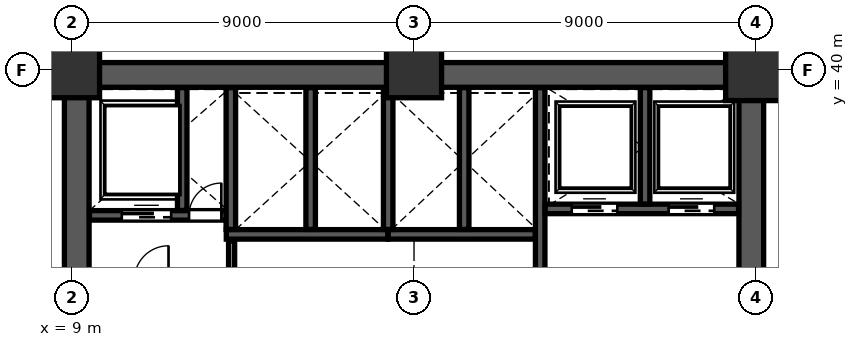
"""IFC4 building model, lengths in metres.
Left out: names, types, materials, properties, quantities, classifications, styles, units other than length and angle.
Written with IfcOpenShell. Run it as: python <this file> out.ifc"""

import sys

from ifc_helpers import new_model, si_unit, direction, frame, frame_2d, origin, origin_2d, place, context, subcontext, project, spatial, rectangle, extrude, source, transform, mapped, element, fill, save


model = new_model("IFC4")
c1 = context("Model", 3, precision=1e-05, world=origin(), true_north=direction((0.0, 1.0)))
c2 = subcontext(c1, "Body", "Model", "MODEL_VIEW")
j1 = project(units=[si_unit("LENGTHUNIT", "METRE"), si_unit("PLANEANGLEUNIT", "RADIAN")], contexts=[c1])
p1 = place(None, origin())
s1 = spatial("IfcSite", under=j1, at=p1, CompositionType="ELEMENT")
p2 = place(p1, origin())
s2 = spatial("IfcBuilding", under=s1, at=p2, CompositionType="ELEMENT")
p3 = place(p2, frame((0.0, 0.0, 22.2)))
s3 = spatial("IfcBuildingStorey", under=s2, at=p3, CompositionType="ELEMENT", Elevation=22.2)
m1 = source(origin(), c2, "Body", "SweptSolid", [
    extrude(rectangle(XDim=1.45, YDim=1.45, at=origin_2d()), origin(), (0.0, 0.0, 1.0), 5.799),
])
for number, where, z_axis, x_axis in (
    (1, (9.0, 40.0, 0.001), (0.0, 0.0, 1.0), (1.0, 0.0, 0.0)),
    (2, (18.0, 40.0, 0.001), (0.0, 0.0, 1.0), (1.0, 0.0, 0.0)),
):
    element("IfcColumn", number, at=place(p3, frame(where, z_axis=z_axis, x_axis=x_axis)), inside=s3, PredefinedType="COLUMN", context=c2, shape_type="MappedRepresentation", body=[
        mapped(m1, transform((0.0, 0.0, 0.0), scale=1.0)),
    ])
m2 = source(origin(), c2, "Body", "SweptSolid", [
    extrude(rectangle(XDim=1.6, YDim=1.6, at=origin_2d()), origin(), (0.0, 0.0, 1.0), 5.799),
])
p4 = place(p3, frame((27.0, 40.0, 0.001), z_axis=(0.0, 0.0, 1.0), x_axis=(1.0, 0.0, 0.0)))
e3 = element("IfcColumn", 3, at=p4, inside=s3, PredefinedType="COLUMN", context=c2, shape_type="MappedRepresentation", body=[
    mapped(m2, transform((0.0, 0.0, 0.0), scale=1.0)),
])
p5 = place(p3, frame((9.125, 24.45, 0.0), z_axis=(0.0, 0.0, 1.0), x_axis=(0.0, 1.0, 0.0)))
e4 = element("IfcWall", 4, at=p5, inside=s3, PredefinedType="SHEAR", context=c2, shape_type="SweptSolid", body=[
    extrude(rectangle(XDim=15.1, YDim=0.65, at=frame_2d((7.55, 0.0))), origin(), (0.0, 0.0, 1.0), 5.52),
])
p6 = place(p3, frame((26.875, 24.45, 0.0), z_axis=(0.0, 0.0, 1.0), x_axis=(0.0, 1.0, 0.0)))
e5 = element("IfcWall", 5, at=p6, inside=s3, PredefinedType="SHEAR", context=c2, shape_type="SweptSolid", body=[
    extrude(rectangle(XDim=15.1, YDim=0.65, at=frame_2d((7.55, 0.0))), origin(), (0.0, 0.0, 1.0), 5.52),
])
p7 = place(p6, frame((8.6, 0.0, 0.0)))
e6 = element("IfcOpeningElement", 6, at=p7, cuts=e5, PredefinedType="OPENING", context=c2, shape_type="SweptSolid", body=[
    extrude(rectangle(XDim=1.15, YDim=2.2, at=frame_2d((0.575, 1.1))), frame((0.0, 0.335, 0.0), z_axis=(0.0, -1.0, 0.0), x_axis=(1.0, 0.0, 0.0)), (0.0, 0.0, 1.0), 0.67),
])
p8 = place(p3, frame((8.8, 39.875, 0.0), z_axis=(0.0, 0.0, 1.0), x_axis=(1.0, 0.0, 0.0)))
e7 = element("IfcWall", 7, at=p8, inside=s3, PredefinedType="SHEAR", context=c2, shape_type="SweptSolid", body=[
    extrude(rectangle(XDim=18.4, YDim=0.65, at=frame_2d((9.2, 0.0))), origin(), (0.0, 0.0, 1.0), 5.52),
])
p9 = place(p3, frame((21.32, 32.12, 0.0), z_axis=(0.0, 0.0, 1.0), x_axis=(0.0, 1.0, 0.0)))
e8 = element("IfcWall", 8, at=p9, inside=s3, PredefinedType="SHEAR", context=c2, shape_type="SweptSolid", body=[
    extrude(rectangle(XDim=7.42, YDim=0.25, at=frame_2d((3.71, 0.0))), origin(), (0.0, 0.0, 1.0), 5.52),
])
p10 = place(p9, frame((1.4, 0.0, 0.0)))
e9 = element("IfcOpeningElement", 9, at=p10, cuts=e8, PredefinedType="OPENING", context=c2, shape_type="SweptSolid", body=[
    extrude(rectangle(XDim=1.15, YDim=2.2, at=frame_2d((0.575, 1.1))), frame((0.0, 0.135, 0.0), z_axis=(0.0, -1.0, 0.0), x_axis=(1.0, 0.0, 0.0)), (0.0, 0.0, 1.0), 0.27),
])
p11 = place(p3, frame((9.46, 36.18, 0.0), z_axis=(0.0, 0.0, 1.0), x_axis=(1.0, 0.0, 0.0)))
e10 = element("IfcWall", 10, at=p11, inside=s3, PredefinedType="SHEAR", context=c2, shape_type="SweptSolid", body=[
    extrude(rectangle(XDim=3.79, YDim=0.25, at=frame_2d((1.895, 0.0))), origin(), (0.0, 0.0, 1.0), 5.52),
])
p12 = place(p11, frame((2.62, 0.0, 0.0)))
e11 = element("IfcOpeningElement", 11, at=p12, cuts=e10, PredefinedType="OPENING", context=c2, shape_type="SweptSolid", body=[
    extrude(rectangle(XDim=0.85, YDim=2.1, at=frame_2d((0.425, 1.05))), frame((0.0, 0.135, 0.0), z_axis=(0.0, -1.0, 0.0), x_axis=(1.0, 0.0, 0.0)), (0.0, 0.0, 1.0), 0.27),
])
p13 = place(p11, frame((0.85, 0.0, 0.0)))
e12 = element("IfcOpeningElement", 12, at=p13, cuts=e10, PredefinedType="OPENING", context=c2, shape_type="SweptSolid", body=[
    extrude(rectangle(XDim=1.3, YDim=2.25, at=frame_2d((0.65, 1.125))), frame((0.0, 0.135, 0.0), z_axis=(0.0, -1.0, 0.0), x_axis=(1.0, 0.0, 0.0)), (0.0, 0.0, 1.0), 0.27),
])
p14 = place(p3, frame((11.9, 36.31, 0.0), z_axis=(0.0, 0.0, 1.0), x_axis=(0.0, 1.0, 0.0)))
e13 = element("IfcWall", 13, at=p14, inside=s3, PredefinedType="SHEAR", context=c2, shape_type="SweptSolid", body=[
    extrude(rectangle(XDim=3.23, YDim=0.25, at=frame_2d((1.615, 0.0))), origin(), (0.0, 0.0, 1.0), 5.52),
])
p15 = place(p3, frame((21.45, 36.35, 0.0), z_axis=(0.0, 0.0, 1.0), x_axis=(1.0, 0.0, 0.0)))
e14 = element("IfcWall", 14, at=p15, inside=s3, PredefinedType="SHEAR", context=c2, shape_type="SweptSolid", body=[
    extrude(rectangle(XDim=5.09, YDim=0.25, at=frame_2d((2.545, 0.0))), origin(), (0.0, 0.0, 1.0), 5.52),
])
p16 = place(p15, frame((0.7, 0.0, 0.0)))
e15 = element("IfcOpeningElement", 15, at=p16, cuts=e14, PredefinedType="OPENING", context=c2, shape_type="SweptSolid", body=[
    extrude(rectangle(XDim=1.2, YDim=2.2, at=frame_2d((0.6, 1.1))), frame((0.0, 0.135, 0.0), z_axis=(0.0, -1.0, 0.0), x_axis=(1.0, 0.0, 0.0)), (0.0, 0.0, 1.0), 0.27),
])
p17 = place(p15, frame((3.25, 0.0, 0.0)))
e16 = element("IfcOpeningElement", 16, at=p17, cuts=e14, PredefinedType="OPENING", context=c2, shape_type="SweptSolid", body=[
    extrude(rectangle(XDim=1.2, YDim=2.2, at=frame_2d((0.6, 1.1))), frame((0.0, 0.135, 0.0), z_axis=(0.0, -1.0, 0.0), x_axis=(1.0, 0.0, 0.0)), (0.0, 0.0, 1.0), 0.27),
])
p18 = place(p3, frame((24.08, 36.48, 0.0), z_axis=(0.0, 0.0, 1.0), x_axis=(0.0, 1.0, 0.0)))
e17 = element("IfcWall", 17, at=p18, inside=s3, PredefinedType="SHEAR", context=c2, shape_type="SweptSolid", body=[
    extrude(rectangle(XDim=3.06, YDim=0.25, at=frame_2d((1.53, 0.0))), origin(), (0.0, 0.0, 1.0), 5.52),
])
p19 = place(p3, frame((13.06, 35.68, 0.0), z_axis=(0.0, 0.0, 1.0), x_axis=(1.0, 0.0, 0.0)))
e18 = element("IfcWall", 18, at=p19, inside=s3, PredefinedType="SHEAR", context=c2, shape_type="SweptSolid", body=[
    extrude(rectangle(XDim=4.25, YDim=0.25, at=frame_2d((2.125, 0.0))), origin(), (0.0, 0.0, 1.0), 5.52),
])
for number, where, z_axis, x_axis in (
    (19, (13.18, 35.81, 0.0), (0.0, 0.0, 1.0), (0.0, 1.0, 0.0)),
    (20, (15.28, 35.81, 0.0), (0.0, 0.0, 1.0), (0.0, 1.0, 0.0)),
):
    element("IfcWall", number, at=place(p3, frame(where, z_axis=z_axis, x_axis=x_axis)), inside=s3, PredefinedType="SHEAR", context=c2, shape_type="SweptSolid", body=[
        extrude(rectangle(XDim=3.73, YDim=0.25, at=frame_2d((1.865, 0.0))), origin(), (0.0, 0.0, 1.0), 5.52),
    ])
p20 = place(p3, frame((17.32, 35.68, 0.0), z_axis=(0.0, 0.0, 1.0), x_axis=(1.0, 0.0, 0.0)))
e21 = element("IfcWall", 21, at=p20, inside=s3, PredefinedType="SHEAR", context=c2, shape_type="SweptSolid", body=[
    extrude(rectangle(XDim=3.87, YDim=0.25, at=frame_2d((1.935, 0.0))), origin(), (0.0, 0.0, 1.0), 5.52),
])
for number, where, z_axis, x_axis in (
    (22, (17.32, 35.81, 0.0), (0.0, 0.0, 1.0), (0.0, 1.0, 0.0)),
    (23, (19.32, 35.81, 0.0), (0.0, 0.0, 1.0), (0.0, 1.0, 0.0)),
):
    element("IfcWall", number, at=place(p3, frame(where, z_axis=z_axis, x_axis=x_axis)), inside=s3, PredefinedType="SHEAR", context=c2, shape_type="SweptSolid", body=[
        extrude(rectangle(XDim=3.73, YDim=0.25, at=frame_2d((1.865, 0.0))), origin(), (0.0, 0.0, 1.0), 5.52),
    ])
p21 = place(p3, frame((13.2, 34.57, 0.0), z_axis=(0.0, 0.0, 1.0), x_axis=(0.0, 1.0, 0.0)))
e24 = element("IfcWall", 24, at=p21, inside=s3, PredefinedType="PARTITIONING", context=c2, shape_type="SweptSolid", body=[
    extrude(rectangle(XDim=0.94, YDim=0.16, at=frame_2d((0.47, 0.0))), origin(), (0.0, 0.0, 1.0), 5.52),
])
m3 = source(origin(), c2, "Body", "SweptSolid", [
    extrude(rectangle(XDim=0.85, YDim=2.1, at=frame_2d((0.425, 1.05))), frame((0.0, 0.025, 0.0), z_axis=(0.0, -1.0, 0.0), x_axis=(1.0, 0.0, 0.0)), (0.0, 0.0, 1.0), 0.05),
])
p22 = place(p12, origin())
e25 = element("IfcDoor", 25, at=p22, inside=s3, OperationType="SINGLE_SWING_RIGHT", PredefinedType="DOOR", context=c2, shape_type="MappedRepresentation", body=[
    mapped(m3, transform((0.0, 0.0, 0.0), scale=1.0)),
])
fill(e11, e25)
m4 = source(origin(), c2, "Body", "SweptSolid", [
    extrude(rectangle(XDim=1.2, YDim=2.2, at=frame_2d((0.6, 1.1))), frame((0.0, 0.025, 0.0), z_axis=(0.0, -1.0, 0.0), x_axis=(1.0, 0.0, 0.0)), (0.0, 0.0, 1.0), 0.05),
])
p23 = place(p16, origin())
e26 = element("IfcDoor", 26, at=p23, inside=s3, OperationType="SLIDING_TO_LEFT", PredefinedType="DOOR", context=c2, shape_type="MappedRepresentation", body=[
    mapped(m4, transform((0.0, 0.0, 0.0), scale=1.0)),
])
fill(e15, e26)
p24 = place(p17, origin())
e27 = element("IfcDoor", 27, at=p24, inside=s3, OperationType="SLIDING_TO_RIGHT", PredefinedType="DOOR", context=c2, shape_type="MappedRepresentation", body=[
    mapped(m4, transform((0.0, 0.0, 0.0), scale=1.0)),
])
fill(e16, e27)
m5 = source(origin(), c2, "Body", "SweptSolid", [
    extrude(rectangle(XDim=1.3, YDim=2.25, at=frame_2d((0.65, 1.125))), frame((0.0, 0.025, 0.0), z_axis=(0.0, -1.0, 0.0), x_axis=(1.0, 0.0, 0.0)), (0.0, 0.0, 1.0), 0.05),
])
p25 = place(p13, origin())
e28 = element("IfcDoor", 28, at=p25, inside=s3, OperationType="SLIDING_TO_LEFT", PredefinedType="DOOR", context=c2, shape_type="MappedRepresentation", body=[
    mapped(m5, transform((0.0, 0.0, 0.0), scale=1.0)),
])
fill(e12, e28)
save(model, sys.argv[1])
